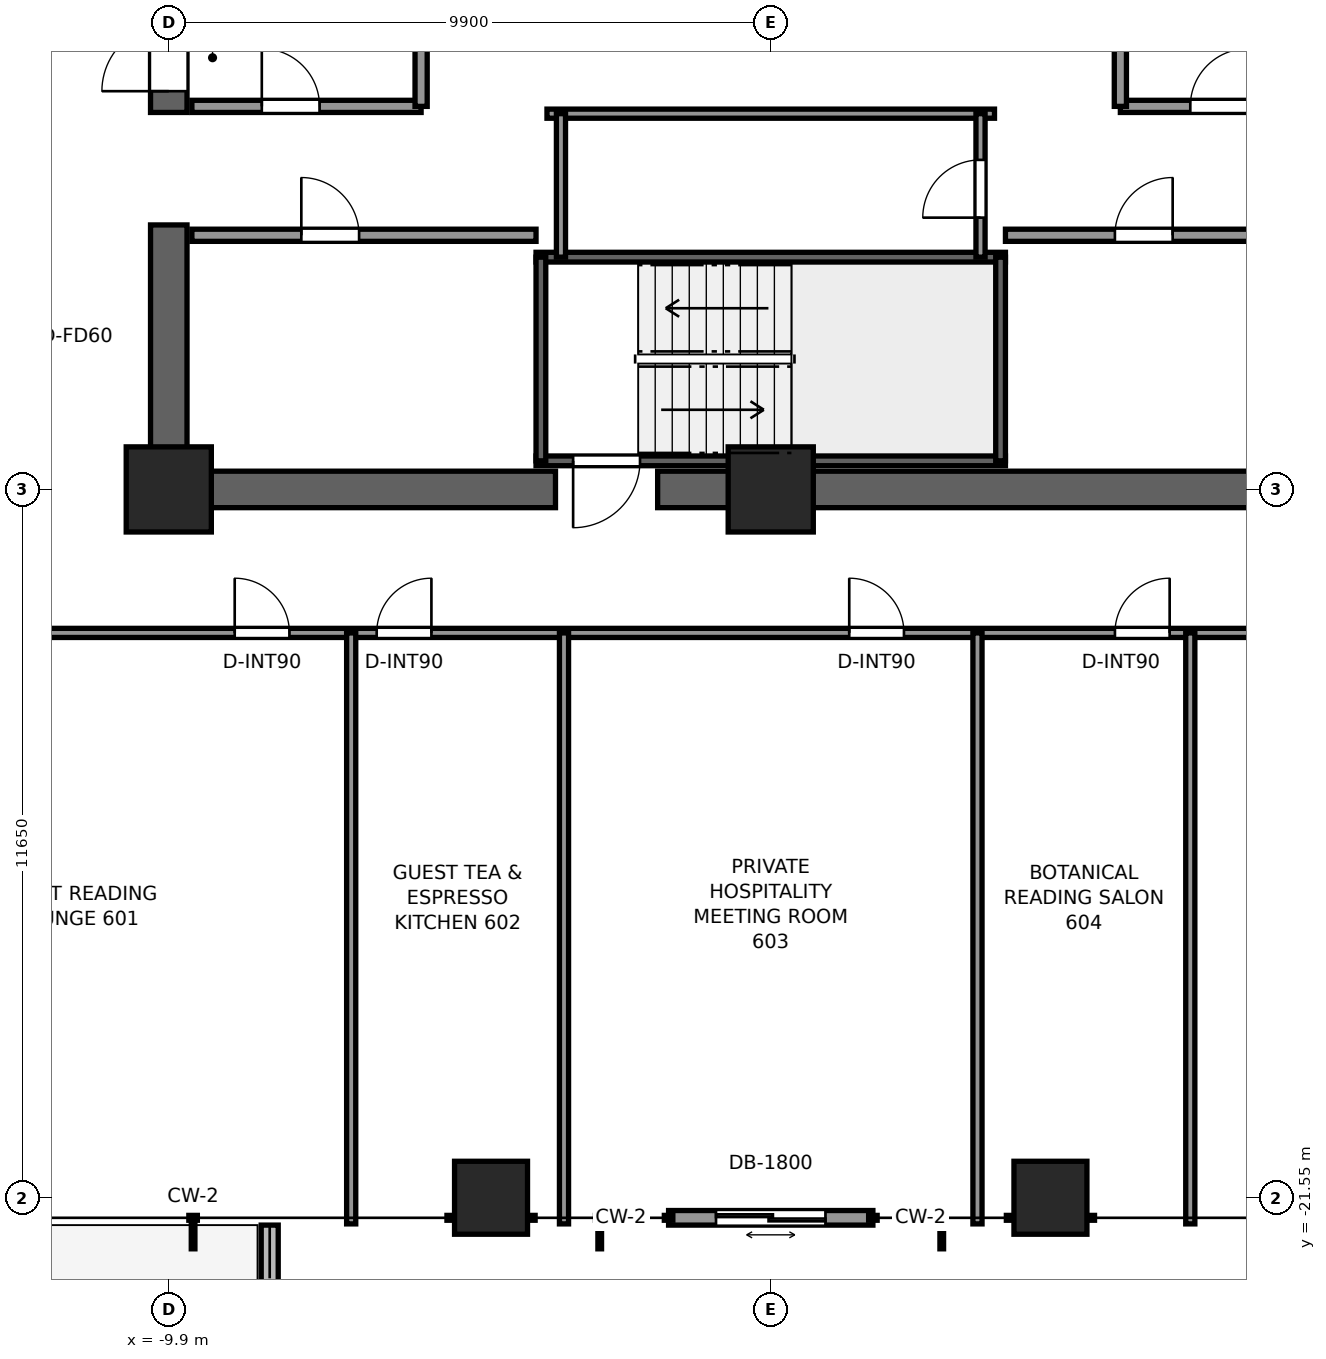
"""IFC4 building model, lengths in metres.
Left out: names, types, materials, properties, quantities, classifications, styles, units other than length and angle.
Written with IfcOpenShell. Run it as: python <this file> out.ifc"""

import sys

from ifc_helpers import new_model, si_unit, direction, frame, frame_2d, origin, origin_2d, place, context, subcontext, project, spatial, rectangle, extrude, element, fill, save


model = new_model("IFC4")
c1 = context("Model", 3, precision=1e-05, world=origin(), true_north=direction((0.0, 1.0)))
c2 = subcontext(c1, "Body", "Model", "MODEL_VIEW")
j1 = project(units=[si_unit("LENGTHUNIT", "METRE"), si_unit("PLANEANGLEUNIT", "RADIAN")], contexts=[c1])
p1 = place(None, origin())
s1 = spatial("IfcSite", under=j1, at=p1, CompositionType="ELEMENT")
p2 = place(p1, origin())
s2 = spatial("IfcBuilding", under=s1, at=p2, CompositionType="ELEMENT")
p3 = place(p2, frame((0.0, 0.0, 23.8)))
s3 = spatial("IfcBuildingStorey", under=s2, at=p3, CompositionType="ELEMENT", Elevation=23.8)
p4 = place(p3, frame((10.2, -9.9, 0.0), z_axis=(0.0, 0.0, 1.0), x_axis=(-1.0, 0.0, 0.0)))
e1 = element("IfcWall", 1, at=p4, inside=s3, PredefinedType="SHEAR", context=c2, shape_type="SweptSolid", body=[
    extrude(rectangle(XDim=12.06, YDim=0.6, at=frame_2d((6.03, 0.0))), origin(), (0.0, 0.0, 1.0), 3.3),
])
p5 = place(p3, frame((-3.54, -9.9, 0.0), z_axis=(0.0, 0.0, 1.0), x_axis=(-1.0, 0.0, 0.0)))
e2 = element("IfcWall", 2, at=p5, inside=s3, PredefinedType="SHEAR", context=c2, shape_type="SweptSolid", body=[
    extrude(rectangle(XDim=6.66, YDim=0.6, at=frame_2d((3.33, 0.0))), origin(), (0.0, 0.0, 1.0), 3.3),
])
p6 = place(p3, frame((-9.9, -9.6, 0.0), z_axis=(0.0, 0.0, 1.0), x_axis=(0.0, 1.0, 0.0)))
e3 = element("IfcWall", 3, at=p6, inside=s3, PredefinedType="SHEAR", context=c2, shape_type="SweptSolid", body=[
    extrude(rectangle(XDim=4.05, YDim=0.6, at=frame_2d((2.025, 0.0))), origin(), (0.0, 0.0, 1.0), 3.3),
])
p7 = place(p3, frame((-9.9, -3.7, 0.0), z_axis=(0.0, 0.0, 1.0), x_axis=(0.0, 1.0, 0.0)))
e4 = element("IfcWall", 4, at=p7, inside=s3, PredefinedType="SHEAR", context=c2, shape_type="SweptSolid", body=[
    extrude(rectangle(XDim=13.3, YDim=0.6, at=frame_2d((6.65, 0.0))), origin(), (0.0, 0.0, 1.0), 3.3),
])
p8 = place(p7, frame((0.35, 0.0, 0.0)))
e5 = element("IfcOpeningElement", 5, at=p8, cuts=e4, PredefinedType="OPENING", context=c2, shape_type="SweptSolid", body=[
    extrude(rectangle(XDim=1.1, YDim=2.2, at=frame_2d((0.55, 1.1))), frame((0.0, 0.31, 0.0), z_axis=(0.0, -1.0, 0.0), x_axis=(1.0, 0.0, 0.0)), (0.0, 0.0, 1.0), 0.62),
])
for number, where, z_axis, x_axis in (
    (6, (-9.9, -9.9, 0.0), (0.0, 0.0, 1.0), (1.0, 0.0, 0.0)),
    (7, (0.0, -9.9, 0.0), (0.0, 0.0, 1.0), (1.0, 0.0, 0.0)),
):
    element("IfcColumn", number, at=place(p3, frame(where, z_axis=z_axis, x_axis=x_axis)), inside=s3, PredefinedType="COLUMN", context=c2, shape_type="SweptSolid", body=[
        extrude(rectangle(XDim=1.4, YDim=1.4, at=origin_2d()), origin(), (0.0, 0.0, 1.0), 3.3),
    ])
for number, where, z_axis, x_axis in (
    (8, (-4.6, -21.55, 0.0), (0.0, 0.0, 1.0), (1.0, 0.0, 0.0)),
    (9, (4.6, -21.55, 0.0), (0.0, 0.0, 1.0), (1.0, 0.0, 0.0)),
):
    element("IfcColumn", number, at=place(p3, frame(where, z_axis=z_axis, x_axis=x_axis)), inside=s3, PredefinedType="COLUMN", context=c2, shape_type="SweptSolid", body=[
        extrude(rectangle(XDim=1.2, YDim=1.2, at=origin_2d()), origin(), (0.0, 0.0, 1.0), 3.3),
    ])
p9 = place(p3, frame((-8.24, -22.0, -0.06), z_axis=(0.0, 0.0, 1.0), x_axis=(0.0, -1.0, 0.0)))
e10 = element("IfcWall", 10, at=p9, inside=s3, PredefinedType="PARAPET", context=c2, shape_type="SweptSolid", body=[
    extrude(rectangle(XDim=2.674, YDim=0.28, at=frame_2d((1.337, 0.0))), origin(), (0.0, 0.0, 1.0), 0.42),
])
p10 = place(p3, frame((1.68, -21.88, 0.0), z_axis=(0.0, 0.0, 1.0), x_axis=(-1.0, 0.0, 0.0)))
e11 = element("IfcWall", 11, at=p10, inside=s3, PredefinedType="STANDARD", context=c2, shape_type="SweptSolid", body=[
    extrude(rectangle(XDim=3.36, YDim=0.24, at=frame_2d((1.68, 0.0))), origin(), (0.0, 0.0, 1.0), 3.06),
])
p11 = place(p10, frame((0.78, 0.0, 0.0)))
e12 = element("IfcOpeningElement", 12, at=p11, cuts=e11, PredefinedType="OPENING", context=c2, shape_type="SweptSolid", body=[
    extrude(rectangle(XDim=1.8, YDim=2.2, at=frame_2d((0.9, 1.1))), frame((0.0, 0.13, 0.0), z_axis=(0.0, -1.0, 0.0), x_axis=(1.0, 0.0, 0.0)), (0.0, 0.0, 1.0), 0.26),
])
p12 = place(p3, frame((3.86, -9.43, 0.0), z_axis=(0.0, 0.0, 1.0), x_axis=(-1.0, 0.0, 0.0)))
e13 = element("IfcWall", 13, at=p12, inside=s3, PredefinedType="SHEAR", context=c2, shape_type="SweptSolid", body=[
    extrude(rectangle(XDim=7.72, YDim=0.16, at=frame_2d((3.86, 0.0))), origin(), (0.0, 0.0, 1.0), 3.3),
])
p13 = place(p12, frame((6.01, 0.0, 0.0)))
e14 = element("IfcOpeningElement", 14, at=p13, cuts=e13, PredefinedType="OPENING", context=c2, shape_type="SweptSolid", body=[
    extrude(rectangle(XDim=1.1, YDim=2.2, at=frame_2d((0.55, 1.1))), frame((0.0, 0.09, 0.0), z_axis=(0.0, -1.0, 0.0), x_axis=(1.0, 0.0, 0.0)), (0.0, 0.0, 1.0), 0.18),
])
p14 = place(p3, frame((-3.86, -6.08, 0.0), z_axis=(0.0, 0.0, 1.0), x_axis=(1.0, 0.0, 0.0)))
e15 = element("IfcWall", 15, at=p14, inside=s3, PredefinedType="SHEAR", context=c2, shape_type="SweptSolid", body=[
    extrude(rectangle(XDim=7.72, YDim=0.16, at=frame_2d((3.86, 0.0))), origin(), (0.0, 0.0, 1.0), 3.3),
])
for number, where, z_axis, x_axis in (
    (16, (-3.78, -9.43, 0.0), (0.0, 0.0, 1.0), (0.0, 1.0, 0.0)),
    (17, (3.78, -9.43, 0.0), (0.0, 0.0, 1.0), (0.0, 1.0, 0.0)),
):
    element("IfcWall", number, at=place(p3, frame(where, z_axis=z_axis, x_axis=x_axis)), inside=s3, PredefinedType="SHEAR", context=c2, shape_type="SweptSolid", body=[
        extrude(rectangle(XDim=3.35, YDim=0.16, at=frame_2d((1.675, 0.0))), origin(), (0.0, 0.0, 1.0), 3.3),
    ])
p15 = place(p3, frame((-9.52, -3.6, 0.0), z_axis=(0.0, 0.0, 1.0), x_axis=(1.0, 0.0, 0.0)))
e18 = element("IfcWall", 18, at=p15, inside=s3, PredefinedType="SOLIDWALL", context=c2, shape_type="SweptSolid", body=[
    extrude(rectangle(XDim=3.77, YDim=0.2, at=frame_2d((1.885, 0.0))), origin(), (0.0, 0.0, 1.0), 3.06),
])
p16 = place(p15, frame((1.15, 0.0, 0.0)))
e19 = element("IfcOpeningElement", 19, at=p16, cuts=e18, PredefinedType="OPENING", context=c2, shape_type="SweptSolid", body=[
    extrude(rectangle(XDim=0.95, YDim=2.06, at=frame_2d((0.475, 1.03))), frame((0.0, 0.11, 0.0), z_axis=(0.0, -1.0, 0.0), x_axis=(1.0, 0.0, 0.0)), (0.0, 0.0, 1.0), 0.22),
])
p17 = place(p3, frame((-5.75, -3.6, 0.0), z_axis=(0.0, 0.0, 1.0), x_axis=(0.0, 1.0, 0.0)))
e20 = element("IfcWall", 20, at=p17, inside=s3, PredefinedType="SOLIDWALL", context=c2, shape_type="SweptSolid", body=[
    extrude(rectangle(XDim=5.57, YDim=0.2, at=frame_2d((2.785, 0.0))), origin(), (0.0, 0.0, 1.0), 3.06),
])
p18 = place(p17, frame((2.75, 0.0, 0.0)))
e21 = element("IfcOpeningElement", 21, at=p18, cuts=e20, PredefinedType="OPENING", context=c2, shape_type="SweptSolid", body=[
    extrude(rectangle(XDim=1.1, YDim=2.2, at=frame_2d((0.55, 1.1))), frame((0.0, 0.11, 0.0), z_axis=(0.0, -1.0, 0.0), x_axis=(1.0, 0.0, 0.0)), (0.0, 0.0, 1.0), 0.22),
])
p19 = place(p3, frame((5.75, -3.6, 0.0), z_axis=(0.0, 0.0, 1.0), x_axis=(1.0, 0.0, 0.0)))
e22 = element("IfcWall", 22, at=p19, inside=s3, PredefinedType="SOLIDWALL", context=c2, shape_type="SweptSolid", body=[
    extrude(rectangle(XDim=3.77, YDim=0.2, at=frame_2d((1.885, 0.0))), origin(), (0.0, 0.0, 1.0), 3.06),
])
p20 = place(p19, frame((1.15, 0.0, 0.0)))
e23 = element("IfcOpeningElement", 23, at=p20, cuts=e22, PredefinedType="OPENING", context=c2, shape_type="SweptSolid", body=[
    extrude(rectangle(XDim=0.95, YDim=2.06, at=frame_2d((0.475, 1.03))), frame((0.0, 0.11, 0.0), z_axis=(0.0, -1.0, 0.0), x_axis=(1.0, 0.0, 0.0)), (0.0, 0.0, 1.0), 0.22),
])
p21 = place(p3, frame((5.75, -3.6, 0.0), z_axis=(0.0, 0.0, 1.0), x_axis=(0.0, 1.0, 0.0)))
e24 = element("IfcWall", 24, at=p21, inside=s3, PredefinedType="SOLIDWALL", context=c2, shape_type="SweptSolid", body=[
    extrude(rectangle(XDim=5.57, YDim=0.2, at=frame_2d((2.785, 0.0))), origin(), (0.0, 0.0, 1.0), 3.06),
])
p22 = place(p21, frame((2.75, 0.0, 0.0)))
e25 = element("IfcOpeningElement", 25, at=p22, cuts=e24, PredefinedType="OPENING", context=c2, shape_type="SweptSolid", body=[
    extrude(rectangle(XDim=1.1, YDim=2.2, at=frame_2d((0.55, 1.1))), frame((0.0, 0.11, 0.0), z_axis=(0.0, -1.0, 0.0), x_axis=(1.0, 0.0, 0.0)), (0.0, 0.0, 1.0), 0.22),
])
p23 = place(p3, frame((-9.52, -5.72, 0.0), z_axis=(0.0, 0.0, 1.0), x_axis=(1.0, 0.0, 0.0)))
e26 = element("IfcWall", 26, at=p23, inside=s3, PredefinedType="SOLIDWALL", context=c2, shape_type="SweptSolid", body=[
    extrude(rectangle(XDim=5.66, YDim=0.2, at=frame_2d((2.83, 0.0))), origin(), (0.0, 0.0, 1.0), 3.06),
])
p24 = place(p23, frame((1.8, 0.0, 0.0)))
e27 = element("IfcOpeningElement", 27, at=p24, cuts=e26, PredefinedType="OPENING", context=c2, shape_type="SweptSolid", body=[
    extrude(rectangle(XDim=0.95, YDim=2.06, at=frame_2d((0.475, 1.03))), frame((0.0, 0.11, 0.0), z_axis=(0.0, -1.0, 0.0), x_axis=(1.0, 0.0, 0.0)), (0.0, 0.0, 1.0), 0.22),
])
p25 = place(p3, frame((3.86, -5.72, 0.0), z_axis=(0.0, 0.0, 1.0), x_axis=(1.0, 0.0, 0.0)))
e28 = element("IfcWall", 28, at=p25, inside=s3, PredefinedType="SOLIDWALL", context=c2, shape_type="SweptSolid", body=[
    extrude(rectangle(XDim=5.66, YDim=0.2, at=frame_2d((2.83, 0.0))), origin(), (0.0, 0.0, 1.0), 3.06),
])
p26 = place(p25, frame((1.8, 0.0, 0.0)))
e29 = element("IfcOpeningElement", 29, at=p26, cuts=e28, PredefinedType="OPENING", context=c2, shape_type="SweptSolid", body=[
    extrude(rectangle(XDim=0.95, YDim=2.06, at=frame_2d((0.475, 1.03))), frame((0.0, 0.11, 0.0), z_axis=(0.0, -1.0, 0.0), x_axis=(1.0, 0.0, 0.0)), (0.0, 0.0, 1.0), 0.22),
])
p27 = place(p3, frame((-3.68, -3.72, 0.0), z_axis=(0.0, 0.0, 1.0), x_axis=(1.0, 0.0, 0.0)))
e30 = element("IfcWall", 30, at=p27, inside=s3, PredefinedType="PARTITIONING", context=c2, shape_type="SweptSolid", body=[
    extrude(rectangle(XDim=7.36, YDim=0.15, at=frame_2d((3.68, 0.0))), origin(), (0.0, 0.0, 1.0), 3.06),
])
p28 = place(p3, frame((3.45, -6.08, 0.0), z_axis=(0.0, 0.0, 1.0), x_axis=(0.0, 1.0, 0.0)))
e31 = element("IfcWall", 31, at=p28, inside=s3, PredefinedType="PARTITIONING", context=c2, shape_type="SweptSolid", body=[
    extrude(rectangle(XDim=2.36, YDim=0.15, at=frame_2d((1.18, 0.0))), origin(), (0.0, 0.0, 1.0), 3.06),
])
p29 = place(p28, frame((0.65, 0.0, 0.0)))
e32 = element("IfcOpeningElement", 32, at=p29, cuts=e31, PredefinedType="OPENING", context=c2, shape_type="SweptSolid", body=[
    extrude(rectangle(XDim=0.95, YDim=2.06, at=frame_2d((0.475, 1.03))), frame((0.0, 0.085, 0.0), z_axis=(0.0, -1.0, 0.0), x_axis=(1.0, 0.0, 0.0)), (0.0, 0.0, 1.0), 0.17),
])
p30 = place(p3, frame((-3.45, -6.08, 0.0), z_axis=(0.0, 0.0, 1.0), x_axis=(0.0, 1.0, 0.0)))
e33 = element("IfcWall", 33, at=p30, inside=s3, PredefinedType="PARTITIONING", context=c2, shape_type="SweptSolid", body=[
    extrude(rectangle(XDim=2.36, YDim=0.15, at=frame_2d((1.18, 0.0))), origin(), (0.0, 0.0, 1.0), 3.06),
])
p31 = place(p3, frame((-12.26, -12.26, 0.0), z_axis=(0.0, 0.0, 1.0), x_axis=(1.0, 0.0, 0.0)))
e34 = element("IfcWall", 34, at=p31, inside=s3, PredefinedType="PARTITIONING", context=c2, shape_type="SweptSolid", body=[
    extrude(rectangle(XDim=24.68, YDim=0.15, at=frame_2d((12.34, 0.0))), origin(), (0.0, 0.0, 1.0), 2.272),
])
p32 = place(p31, frame((3.444, 0.0, 0.0)))
e35 = element("IfcOpeningElement", 35, at=p32, cuts=e34, PredefinedType="OPENING", context=c2, shape_type="SweptSolid", body=[
    extrude(rectangle(XDim=0.9, YDim=2.06, at=frame_2d((0.45, 1.03))), frame((0.0, 0.085, 0.0), z_axis=(0.0, -1.0, 0.0), x_axis=(1.0, 0.0, 0.0)), (0.0, 0.0, 1.0), 0.17),
])
p33 = place(p31, frame((5.779, 0.0, 0.0)))
e36 = element("IfcOpeningElement", 36, at=p33, cuts=e34, PredefinedType="OPENING", context=c2, shape_type="SweptSolid", body=[
    extrude(rectangle(XDim=0.9, YDim=2.06, at=frame_2d((0.45, 1.03))), frame((0.0, 0.085, 0.0), z_axis=(0.0, -1.0, 0.0), x_axis=(1.0, 0.0, 0.0)), (0.0, 0.0, 1.0), 0.17),
])
p34 = place(p31, frame((13.551, 0.0, 0.0)))
e37 = element("IfcOpeningElement", 37, at=p34, cuts=e34, PredefinedType="OPENING", context=c2, shape_type="SweptSolid", body=[
    extrude(rectangle(XDim=0.9, YDim=2.06, at=frame_2d((0.45, 1.03))), frame((0.0, 0.085, 0.0), z_axis=(0.0, -1.0, 0.0), x_axis=(1.0, 0.0, 0.0)), (0.0, 0.0, 1.0), 0.17),
])
p35 = place(p31, frame((17.921, 0.0, 0.0)))
e38 = element("IfcOpeningElement", 38, at=p35, cuts=e34, PredefinedType="OPENING", context=c2, shape_type="SweptSolid", body=[
    extrude(rectangle(XDim=0.9, YDim=2.06, at=frame_2d((0.45, 1.03))), frame((0.0, 0.085, 0.0), z_axis=(0.0, -1.0, 0.0), x_axis=(1.0, 0.0, 0.0)), (0.0, 0.0, 1.0), 0.17),
])
p36 = place(p31, frame((20.256, 0.0, 0.0)))
e39 = element("IfcOpeningElement", 39, at=p36, cuts=e34, PredefinedType="OPENING", context=c2, shape_type="SweptSolid", body=[
    extrude(rectangle(XDim=0.9, YDim=2.06, at=frame_2d((0.45, 1.03))), frame((0.0, 0.085, 0.0), z_axis=(0.0, -1.0, 0.0), x_axis=(1.0, 0.0, 0.0)), (0.0, 0.0, 1.0), 0.17),
])
for number, where, z_axis, x_axis in (
    (40, (-6.9, -21.98, 0.0), (0.0, 0.0, 1.0), (0.0, 1.0, 0.0)),
    (41, (-3.4, -21.98, 0.0), (0.0, 0.0, 1.0), (0.0, 1.0, 0.0)),
    (42, (3.4, -21.98, 0.0), (0.0, 0.0, 1.0), (0.0, 1.0, 0.0)),
    (43, (6.9, -21.98, 0.0), (0.0, 0.0, 1.0), (0.0, 1.0, 0.0)),
):
    element("IfcWall", number, at=place(p3, frame(where, z_axis=z_axis, x_axis=x_axis)), inside=s3, PredefinedType="PARTITIONING", context=c2, shape_type="SweptSolid", body=[
        extrude(rectangle(XDim=9.72, YDim=0.15, at=frame_2d((4.86, 0.0))), origin(), (0.0, 0.0, 1.0), 2.429),
    ])
p37 = place(p11, origin())
e44 = element("IfcDoor", 44, at=p37, inside=s3, OperationType="DOUBLE_DOOR_SLIDING", PredefinedType="DOOR", context=c2, shape_type="SweptSolid", body=[
    extrude(rectangle(XDim=1.8, YDim=2.2, at=frame_2d((0.9, 1.1))), frame((0.0, 0.025, 0.0), z_axis=(0.0, -1.0, 0.0), x_axis=(1.0, 0.0, 0.0)), (0.0, 0.0, 1.0), 0.05),
])
fill(e12, e44)
p38 = place(p13, origin())
e45 = element("IfcDoor", 45, at=p38, inside=s3, OperationType="SINGLE_SWING_RIGHT", PredefinedType="DOOR", context=c2, shape_type="SweptSolid", body=[
    extrude(rectangle(XDim=1.1, YDim=2.2, at=frame_2d((0.55, 1.1))), frame((0.0, 0.025, 0.0), z_axis=(0.0, -1.0, 0.0), x_axis=(1.0, 0.0, 0.0)), (0.0, 0.0, 1.0), 0.05),
])
fill(e14, e45)
p39 = place(p8, origin())
e46 = element("IfcDoor", 46, at=p39, inside=s3, OperationType="SINGLE_SWING_LEFT", PredefinedType="DOOR", context=c2, shape_type="SweptSolid", body=[
    extrude(rectangle(XDim=1.1, YDim=2.2, at=frame_2d((0.55, 1.1))), frame((0.0, 0.025, 0.0), z_axis=(0.0, -1.0, 0.0), x_axis=(1.0, 0.0, 0.0)), (0.0, 0.0, 1.0), 0.05),
])
fill(e5, e46)
p40 = place(p24, origin())
e47 = element("IfcDoor", 47, at=p40, inside=s3, OperationType="SINGLE_SWING_LEFT", PredefinedType="DOOR", context=c2, shape_type="SweptSolid", body=[
    extrude(rectangle(XDim=0.95, YDim=2.06, at=frame_2d((0.475, 1.03))), frame((0.0, 0.025, 0.0), z_axis=(0.0, -1.0, 0.0), x_axis=(1.0, 0.0, 0.0)), (0.0, 0.0, 1.0), 0.05),
])
fill(e27, e47)
p41 = place(p16, origin())
e48 = element("IfcDoor", 48, at=p41, inside=s3, OperationType="SINGLE_SWING_LEFT", PredefinedType="DOOR", context=c2, shape_type="SweptSolid", body=[
    extrude(rectangle(XDim=0.95, YDim=2.06, at=frame_2d((0.475, 1.03))), frame((0.0, 0.025, 0.0), z_axis=(0.0, -1.0, 0.0), x_axis=(1.0, 0.0, 0.0)), (0.0, 0.0, 1.0), 0.05),
])
fill(e19, e48)
p42 = place(p26, origin())
e49 = element("IfcDoor", 49, at=p42, inside=s3, OperationType="SINGLE_SWING_RIGHT", PredefinedType="DOOR", context=c2, shape_type="SweptSolid", body=[
    extrude(rectangle(XDim=0.95, YDim=2.06, at=frame_2d((0.475, 1.03))), frame((0.0, 0.025, 0.0), z_axis=(0.0, -1.0, 0.0), x_axis=(1.0, 0.0, 0.0)), (0.0, 0.0, 1.0), 0.05),
])
fill(e29, e49)
p43 = place(p20, origin())
e50 = element("IfcDoor", 50, at=p43, inside=s3, OperationType="SINGLE_SWING_RIGHT", PredefinedType="DOOR", context=c2, shape_type="SweptSolid", body=[
    extrude(rectangle(XDim=0.95, YDim=2.06, at=frame_2d((0.475, 1.03))), frame((0.0, 0.025, 0.0), z_axis=(0.0, -1.0, 0.0), x_axis=(1.0, 0.0, 0.0)), (0.0, 0.0, 1.0), 0.05),
])
fill(e23, e50)
p44 = place(p29, origin())
e51 = element("IfcDoor", 51, at=p44, inside=s3, OperationType="SINGLE_SWING_LEFT", PredefinedType="DOOR", context=c2, shape_type="SweptSolid", body=[
    extrude(rectangle(XDim=0.95, YDim=2.06, at=frame_2d((0.475, 1.03))), frame((0.0, 0.025, 0.0), z_axis=(0.0, -1.0, 0.0), x_axis=(1.0, 0.0, 0.0)), (0.0, 0.0, 1.0), 0.05),
])
fill(e32, e51)
p45 = place(p32, origin())
e52 = element("IfcDoor", 52, at=p45, inside=s3, OperationType="SINGLE_SWING_LEFT", PredefinedType="DOOR", context=c2, shape_type="SweptSolid", body=[
    extrude(rectangle(XDim=0.9, YDim=2.06, at=frame_2d((0.45, 1.03))), frame((0.0, 0.025, 0.0), z_axis=(0.0, -1.0, 0.0), x_axis=(1.0, 0.0, 0.0)), (0.0, 0.0, 1.0), 0.05),
])
fill(e35, e52)
p46 = place(p33, origin())
e53 = element("IfcDoor", 53, at=p46, inside=s3, OperationType="SINGLE_SWING_RIGHT", PredefinedType="DOOR", context=c2, shape_type="SweptSolid", body=[
    extrude(rectangle(XDim=0.9, YDim=2.06, at=frame_2d((0.45, 1.03))), frame((0.0, 0.025, 0.0), z_axis=(0.0, -1.0, 0.0), x_axis=(1.0, 0.0, 0.0)), (0.0, 0.0, 1.0), 0.05),
])
fill(e36, e53)
p47 = place(p34, origin())
e54 = element("IfcDoor", 54, at=p47, inside=s3, OperationType="SINGLE_SWING_LEFT", PredefinedType="DOOR", context=c2, shape_type="SweptSolid", body=[
    extrude(rectangle(XDim=0.9, YDim=2.06, at=frame_2d((0.45, 1.03))), frame((0.0, 0.025, 0.0), z_axis=(0.0, -1.0, 0.0), x_axis=(1.0, 0.0, 0.0)), (0.0, 0.0, 1.0), 0.05),
])
fill(e37, e54)
p48 = place(p35, origin())
e55 = element("IfcDoor", 55, at=p48, inside=s3, OperationType="SINGLE_SWING_RIGHT", PredefinedType="DOOR", context=c2, shape_type="SweptSolid", body=[
    extrude(rectangle(XDim=0.9, YDim=2.06, at=frame_2d((0.45, 1.03))), frame((0.0, 0.025, 0.0), z_axis=(0.0, -1.0, 0.0), x_axis=(1.0, 0.0, 0.0)), (0.0, 0.0, 1.0), 0.05),
])
fill(e38, e55)
save(model, sys.argv[1])
